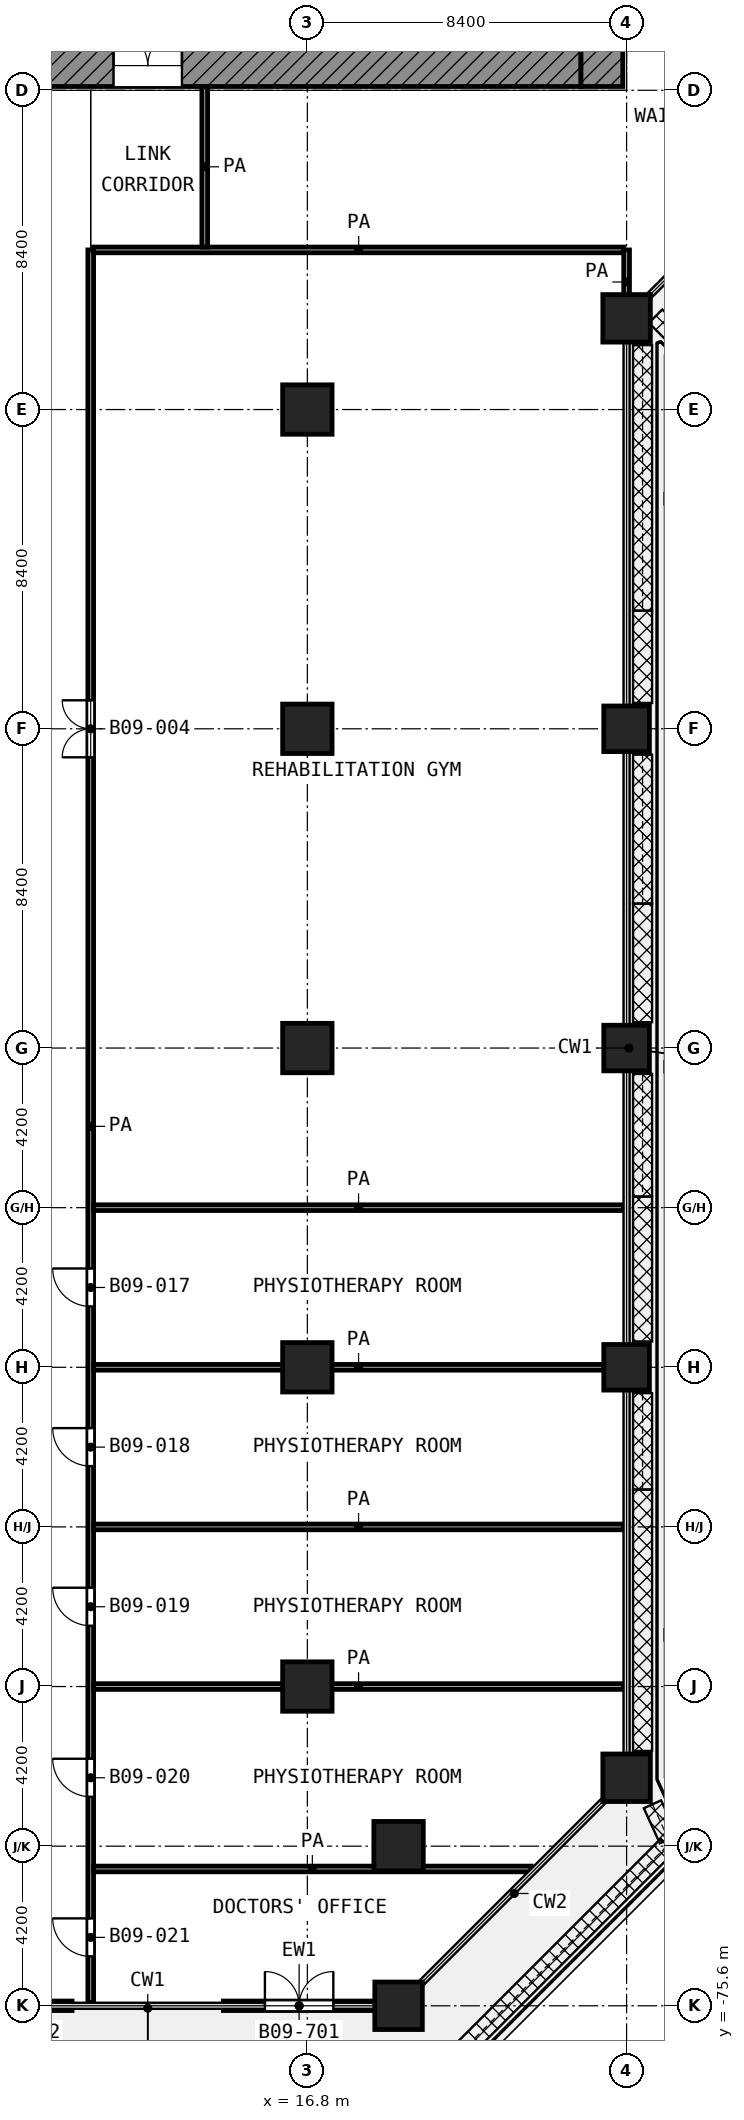
"""IFC4 building model, lengths in metres.
Left out: names, types, materials, properties, quantities, classifications, styles, units other than length and angle.
Written with IfcOpenShell. Run it as: python <this file> out.ifc"""

import sys

from ifc_helpers import new_model, si_unit, direction, frame, frame_2d, origin, origin_2d, place, context, subcontext, project, spatial, rectangle, extrude, element, fill, save


model = new_model("IFC4")
c1 = context("Model", 3, precision=1e-05, world=origin(), true_north=direction((0.0, 1.0)))
c2 = subcontext(c1, "Body", "Model", "MODEL_VIEW")
j1 = project(units=[si_unit("LENGTHUNIT", "METRE"), si_unit("PLANEANGLEUNIT", "RADIAN")], contexts=[c1])
p1 = place(None, origin())
s1 = spatial("IfcSite", under=j1, at=p1, CompositionType="ELEMENT")
p2 = place(p1, origin())
s2 = spatial("IfcBuilding", under=s1, at=p2, CompositionType="ELEMENT")
p3 = place(p2, frame((0.0, 0.0, 43.4)))
s3 = spatial("IfcBuildingStorey", under=s2, at=p3, CompositionType="ELEMENT", Elevation=43.4)
p4 = place(p3, frame((25.2, -31.2, 0.0), z_axis=(0.0, 0.0, 1.0), x_axis=(1.0, 0.0, 0.0)))
e1 = element("IfcColumn", 1, at=p4, inside=s3, PredefinedType="COLUMN", context=c2, shape_type="SweptSolid", body=[
    extrude(rectangle(XDim=1.25, YDim=1.25, at=origin_2d()), origin(), (0.0, 0.0, 1.0), 4.2),
])
for number, where, z_axis, x_axis in (
    (2, (16.8, -33.6, 0.0), (0.0, 0.0, 1.0), (1.0, 0.0, 0.0)),
    (3, (16.8, -42.0, 0.0), (0.0, 0.0, 1.0), (1.0, 0.0, 0.0)),
):
    element("IfcColumn", number, at=place(p3, frame(where, z_axis=z_axis, x_axis=x_axis)), inside=s3, PredefinedType="COLUMN", context=c2, shape_type="SweptSolid", body=[
        extrude(rectangle(XDim=1.3, YDim=1.3, at=origin_2d()), origin(), (0.0, 0.0, 1.0), 4.2),
    ])
p5 = place(p3, frame((25.2, -42.0, 0.0), z_axis=(0.0, 0.0, 1.0), x_axis=(1.0, 0.0, 0.0)))
e4 = element("IfcColumn", 4, at=p5, inside=s3, PredefinedType="COLUMN", context=c2, shape_type="SweptSolid", body=[
    extrude(rectangle(XDim=1.2, YDim=1.2, at=origin_2d()), origin(), (0.0, 0.0, 1.0), 4.2),
])
p6 = place(p3, frame((16.8, -50.4, 0.0), z_axis=(0.0, 0.0, 1.0), x_axis=(1.0, 0.0, 0.0)))
e5 = element("IfcColumn", 5, at=p6, inside=s3, PredefinedType="COLUMN", context=c2, shape_type="SweptSolid", body=[
    extrude(rectangle(XDim=1.3, YDim=1.3, at=origin_2d()), origin(), (0.0, 0.0, 1.0), 4.2),
])
p7 = place(p3, frame((25.2, -50.4, 0.0), z_axis=(0.0, 0.0, 1.0), x_axis=(1.0, 0.0, 0.0)))
e6 = element("IfcColumn", 6, at=p7, inside=s3, PredefinedType="COLUMN", context=c2, shape_type="SweptSolid", body=[
    extrude(rectangle(XDim=1.2, YDim=1.2, at=origin_2d()), origin(), (0.0, 0.0, 1.0), 4.2),
])
p8 = place(p3, frame((16.8, -58.8, 0.0), z_axis=(0.0, 0.0, 1.0), x_axis=(1.0, 0.0, 0.0)))
e7 = element("IfcColumn", 7, at=p8, inside=s3, PredefinedType="COLUMN", context=c2, shape_type="SweptSolid", body=[
    extrude(rectangle(XDim=1.3, YDim=1.3, at=origin_2d()), origin(), (0.0, 0.0, 1.0), 4.2),
])
p9 = place(p3, frame((25.2, -58.8, 0.0), z_axis=(0.0, 0.0, 1.0), x_axis=(1.0, 0.0, 0.0)))
e8 = element("IfcColumn", 8, at=p9, inside=s3, PredefinedType="COLUMN", context=c2, shape_type="SweptSolid", body=[
    extrude(rectangle(XDim=1.2, YDim=1.2, at=origin_2d()), origin(), (0.0, 0.0, 1.0), 4.2),
])
p10 = place(p3, frame((16.8, -67.2, 0.0), z_axis=(0.0, 0.0, 1.0), x_axis=(1.0, 0.0, 0.0)))
e9 = element("IfcColumn", 9, at=p10, inside=s3, PredefinedType="COLUMN", context=c2, shape_type="SweptSolid", body=[
    extrude(rectangle(XDim=1.3, YDim=1.3, at=origin_2d()), origin(), (0.0, 0.0, 1.0), 4.2),
])
p11 = place(p3, frame((25.2, -69.6, 0.0), z_axis=(0.0, 0.0, 1.0), x_axis=(1.0, 0.0, 0.0)))
e10 = element("IfcColumn", 10, at=p11, inside=s3, PredefinedType="COLUMN", context=c2, shape_type="SweptSolid", body=[
    extrude(rectangle(XDim=1.25, YDim=1.25, at=origin_2d()), origin(), (0.0, 0.0, 1.0), 4.2),
])
p12 = place(p3, frame((19.2, -71.4, 0.0), z_axis=(0.0, 0.0, 1.0), x_axis=(1.0, 0.0, 0.0)))
e11 = element("IfcColumn", 11, at=p12, inside=s3, PredefinedType="COLUMN", context=c2, shape_type="SweptSolid", body=[
    extrude(rectangle(XDim=1.3, YDim=1.3, at=origin_2d()), origin(), (0.0, 0.0, 1.0), 4.2),
])
p13 = place(p3, frame((19.2, -75.6, 0.0), z_axis=(0.0, 0.0, 1.0), x_axis=(1.0, 0.0, 0.0)))
e12 = element("IfcColumn", 12, at=p13, inside=s3, PredefinedType="COLUMN", context=c2, shape_type="SweptSolid", body=[
    extrude(rectangle(XDim=1.25, YDim=1.25, at=origin_2d()), origin(), (0.0, 0.0, 1.0), 4.2),
])
p14 = place(p3, frame((6.625, -75.6, 0.0), z_axis=(0.0, 0.0, 1.0), x_axis=(1.0, 0.0, 0.0)))
e13 = element("IfcWall", 13, at=p14, inside=s3, PredefinedType="SOLIDWALL", context=c2, shape_type="SweptSolid", body=[
    extrude(rectangle(XDim=3.983, YDim=0.25, at=frame_2d((1.992, 0.0))), origin(), (0.0, 0.0, 1.0), 3.78),
])
p15 = place(p14, frame((2.092, 0.0, 0.0)))
e14 = element("IfcOpeningElement", 14, at=p15, cuts=e13, PredefinedType="OPENING", context=c2, shape_type="SweptSolid", body=[
    extrude(rectangle(XDim=1.0, YDim=2.1, at=frame_2d((0.5, 1.05))), frame((0.0, 0.135, 0.0), z_axis=(0.0, -1.0, 0.0), x_axis=(1.0, 0.0, 0.0)), (0.0, 0.0, 1.0), 0.27),
])
p16 = place(p3, frame((14.592, -75.6, 0.0), z_axis=(0.0, 0.0, 1.0), x_axis=(1.0, 0.0, 0.0)))
e15 = element("IfcWall", 15, at=p16, inside=s3, PredefinedType="SOLIDWALL", context=c2, shape_type="SweptSolid", body=[
    extrude(rectangle(XDim=3.983, YDim=0.25, at=frame_2d((1.992, 0.0))), origin(), (0.0, 0.0, 1.0), 3.78),
])
p17 = place(p16, frame((1.092, 0.0, 0.0)))
e16 = element("IfcOpeningElement", 16, at=p17, cuts=e15, PredefinedType="OPENING", context=c2, shape_type="SweptSolid", body=[
    extrude(rectangle(XDim=1.8, YDim=2.1, at=frame_2d((0.9, 1.05))), frame((0.0, 0.135, 0.0), z_axis=(0.0, -1.0, 0.0), x_axis=(1.0, 0.0, 0.0)), (0.0, 0.0, 1.0), 0.27),
])
p18 = place(p3, frame((5.4, -24.55, 0.0), z_axis=(0.0, 0.0, 1.0), x_axis=(1.0, 0.0, 0.0)))
e17 = element("IfcWall", 17, at=p18, inside=s3, PredefinedType="SHEAR", context=c2, shape_type="SweptSolid", body=[
    extrude(rectangle(XDim=18.6, YDim=1.1, at=frame_2d((9.3, 0.0))), origin(), (0.0, 0.0, 1.0), 3.9),
])
p19 = place(p18, frame((6.3, 0.0, 0.0)))
e18 = element("IfcOpeningElement", 18, at=p19, cuts=e17, PredefinedType="OPENING", context=c2, shape_type="SweptSolid", body=[
    extrude(rectangle(XDim=1.8, YDim=2.1, at=frame_2d((0.9, 1.05))), frame((0.0, 0.56, 0.0), z_axis=(0.0, -1.0, 0.0), x_axis=(1.0, 0.0, 0.0)), (0.0, 0.0, 1.0), 1.12),
])
p20 = place(p3, frame((24.55, -25.1, 0.0), z_axis=(0.0, 0.0, 1.0), x_axis=(0.0, 1.0, 0.0)))
e19 = element("IfcWall", 19, at=p20, inside=s3, PredefinedType="SHEAR", context=c2, shape_type="SweptSolid", body=[
    extrude(rectangle(XDim=1.1, YDim=1.1, at=frame_2d((0.55, 0.0))), origin(), (0.0, 0.0, 1.0), 3.9),
])
p21 = place(p3, frame((11.175, -72.0, 0.0), z_axis=(0.0, 0.0, 1.0), x_axis=(1.0, 0.0, 0.0)))
e20 = element("IfcWall", 20, at=p21, inside=s3, PredefinedType="PARTITIONING", context=c2, shape_type="SweptSolid", body=[
    extrude(rectangle(XDim=11.512, YDim=0.15, at=frame_2d((5.756, 0.0))), origin(), (0.0, 0.0, 1.0), 3.9),
])
for number, where, z_axis, x_axis in (
    (21, (11.175, -67.2, 0.0), (0.0, 0.0, 1.0), (1.0, 0.0, 0.0)),
    (22, (11.175, -63.0, 0.0), (0.0, 0.0, 1.0), (1.0, 0.0, 0.0)),
    (23, (11.175, -58.8, 0.0), (0.0, 0.0, 1.0), (1.0, 0.0, 0.0)),
    (24, (11.175, -54.6, 0.0), (0.0, 0.0, 1.0), (1.0, 0.0, 0.0)),
):
    element("IfcWall", number, at=place(p3, frame(where, z_axis=z_axis, x_axis=x_axis)), inside=s3, PredefinedType="PARTITIONING", context=c2, shape_type="SweptSolid", body=[
        extrude(rectangle(XDim=13.945, YDim=0.15, at=frame_2d((6.973, 0.0))), origin(), (0.0, 0.0, 1.0), 3.9),
    ])
p22 = place(p3, frame((11.175, -29.4, 0.0), z_axis=(0.0, 0.0, 1.0), x_axis=(1.0, 0.0, 0.0)))
e25 = element("IfcWall", 25, at=p22, inside=s3, PredefinedType="PARTITIONING", context=c2, shape_type="SweptSolid", body=[
    extrude(rectangle(XDim=13.95, YDim=0.15, at=frame_2d((6.975, 0.0))), origin(), (0.0, 0.0, 1.0), 3.9),
])
p23 = place(p3, frame((11.1, -75.52, 0.0), z_axis=(0.0, 0.0, 1.0), x_axis=(0.0, 1.0, 0.0)))
e26 = element("IfcWall", 26, at=p23, inside=s3, PredefinedType="PARTITIONING", context=c2, shape_type="SweptSolid", body=[
    extrude(rectangle(XDim=46.12, YDim=0.15, at=frame_2d((23.06, 0.0))), origin(), (0.0, 0.0, 1.0), 3.9),
])
p24 = place(p23, frame((32.77, 0.0, 0.0)))
e27 = element("IfcOpeningElement", 27, at=p24, cuts=e26, PredefinedType="OPENING", context=c2, shape_type="SweptSolid", body=[
    extrude(rectangle(XDim=1.5, YDim=2.1, at=frame_2d((0.75, 1.05))), frame((0.0, 0.085, 0.0), z_axis=(0.0, -1.0, 0.0), x_axis=(1.0, 0.0, 0.0)), (0.0, 0.0, 1.0), 0.17),
])
p25 = place(p23, frame((18.32, 0.0, 0.0)))
e28 = element("IfcOpeningElement", 28, at=p25, cuts=e26, PredefinedType="OPENING", context=c2, shape_type="SweptSolid", body=[
    extrude(rectangle(XDim=1.0, YDim=2.1, at=frame_2d((0.5, 1.05))), frame((0.0, 0.085, 0.0), z_axis=(0.0, -1.0, 0.0), x_axis=(1.0, 0.0, 0.0)), (0.0, 0.0, 1.0), 0.17),
])
p26 = place(p23, frame((14.12, 0.0, 0.0)))
e29 = element("IfcOpeningElement", 29, at=p26, cuts=e26, PredefinedType="OPENING", context=c2, shape_type="SweptSolid", body=[
    extrude(rectangle(XDim=1.0, YDim=2.1, at=frame_2d((0.5, 1.05))), frame((0.0, 0.085, 0.0), z_axis=(0.0, -1.0, 0.0), x_axis=(1.0, 0.0, 0.0)), (0.0, 0.0, 1.0), 0.17),
])
p27 = place(p23, frame((9.92, 0.0, 0.0)))
e30 = element("IfcOpeningElement", 30, at=p27, cuts=e26, PredefinedType="OPENING", context=c2, shape_type="SweptSolid", body=[
    extrude(rectangle(XDim=1.0, YDim=2.1, at=frame_2d((0.5, 1.05))), frame((0.0, 0.085, 0.0), z_axis=(0.0, -1.0, 0.0), x_axis=(1.0, 0.0, 0.0)), (0.0, 0.0, 1.0), 0.17),
])
p28 = place(p23, frame((5.42, 0.0, 0.0)))
e31 = element("IfcOpeningElement", 31, at=p28, cuts=e26, PredefinedType="OPENING", context=c2, shape_type="SweptSolid", body=[
    extrude(rectangle(XDim=1.0, YDim=2.1, at=frame_2d((0.5, 1.05))), frame((0.0, 0.085, 0.0), z_axis=(0.0, -1.0, 0.0), x_axis=(1.0, 0.0, 0.0)), (0.0, 0.0, 1.0), 0.17),
])
p29 = place(p23, frame((1.22, 0.0, 0.0)))
e32 = element("IfcOpeningElement", 32, at=p29, cuts=e26, PredefinedType="OPENING", context=c2, shape_type="SweptSolid", body=[
    extrude(rectangle(XDim=1.0, YDim=2.1, at=frame_2d((0.5, 1.05))), frame((0.0, 0.085, 0.0), z_axis=(0.0, -1.0, 0.0), x_axis=(1.0, 0.0, 0.0)), (0.0, 0.0, 1.0), 0.17),
])
p30 = place(p3, frame((14.1, -29.325, 0.0), z_axis=(0.0, 0.0, 1.0), x_axis=(0.0, 1.0, 0.0)))
e33 = element("IfcWall", 33, at=p30, inside=s3, PredefinedType="PARTITIONING", context=c2, shape_type="SweptSolid", body=[
    extrude(rectangle(XDim=4.225, YDim=0.15, at=frame_2d((2.112, 0.0))), origin(), (0.0, 0.0, 1.0), 3.9),
])
p31 = place(p3, frame((25.2, -31.087, 0.0), z_axis=(0.0, 0.0, 1.0), x_axis=(0.0, 1.0, 0.0)))
e34 = element("IfcWall", 34, at=p31, inside=s3, PredefinedType="PARTITIONING", context=c2, shape_type="SweptSolid", body=[
    extrude(rectangle(XDim=1.687, YDim=0.15, at=frame_2d((0.844, 0.0))), origin(), (0.0, 0.0, 1.0), 3.9),
])
p32 = place(p17, origin())
e35 = element("IfcDoor", 35, at=p32, inside=s3, OperationType="DOUBLE_DOOR_SINGLE_SWING", PredefinedType="DOOR", context=c2, shape_type="SweptSolid", body=[
    extrude(rectangle(XDim=1.8, YDim=2.1, at=frame_2d((0.9, 1.05))), frame((0.0, 0.025, 0.0), z_axis=(0.0, -1.0, 0.0), x_axis=(1.0, 0.0, 0.0)), (0.0, 0.0, 1.0), 0.05),
])
fill(e16, e35)
p33 = place(p19, origin())
e36 = element("IfcDoor", 36, at=p33, inside=s3, OperationType="DOUBLE_DOOR_SINGLE_SWING", PredefinedType="DOOR", context=c2, shape_type="SweptSolid", body=[
    extrude(rectangle(XDim=1.8, YDim=2.1, at=frame_2d((0.9, 1.05))), frame((0.0, 0.025, 0.0), z_axis=(0.0, -1.0, 0.0), x_axis=(1.0, 0.0, 0.0)), (0.0, 0.0, 1.0), 0.05),
])
fill(e18, e36)
p34 = place(p24, origin())
e37 = element("IfcDoor", 37, at=p34, inside=s3, OperationType="DOUBLE_DOOR_SINGLE_SWING", PredefinedType="DOOR", context=c2, shape_type="SweptSolid", body=[
    extrude(rectangle(XDim=1.5, YDim=2.1, at=frame_2d((0.75, 1.05))), frame((0.0, 0.025, 0.0), z_axis=(0.0, -1.0, 0.0), x_axis=(1.0, 0.0, 0.0)), (0.0, 0.0, 1.0), 0.05),
])
fill(e27, e37)
p35 = place(p25, origin())
e38 = element("IfcDoor", 38, at=p35, inside=s3, OperationType="SINGLE_SWING_RIGHT", PredefinedType="DOOR", context=c2, shape_type="SweptSolid", body=[
    extrude(rectangle(XDim=1.0, YDim=2.1, at=frame_2d((0.5, 1.05))), frame((0.0, 0.025, 0.0), z_axis=(0.0, -1.0, 0.0), x_axis=(1.0, 0.0, 0.0)), (0.0, 0.0, 1.0), 0.05),
])
fill(e28, e38)
p36 = place(p26, origin())
e39 = element("IfcDoor", 39, at=p36, inside=s3, OperationType="SINGLE_SWING_RIGHT", PredefinedType="DOOR", context=c2, shape_type="SweptSolid", body=[
    extrude(rectangle(XDim=1.0, YDim=2.1, at=frame_2d((0.5, 1.05))), frame((0.0, 0.025, 0.0), z_axis=(0.0, -1.0, 0.0), x_axis=(1.0, 0.0, 0.0)), (0.0, 0.0, 1.0), 0.05),
])
fill(e29, e39)
p37 = place(p27, origin())
e40 = element("IfcDoor", 40, at=p37, inside=s3, OperationType="SINGLE_SWING_RIGHT", PredefinedType="DOOR", context=c2, shape_type="SweptSolid", body=[
    extrude(rectangle(XDim=1.0, YDim=2.1, at=frame_2d((0.5, 1.05))), frame((0.0, 0.025, 0.0), z_axis=(0.0, -1.0, 0.0), x_axis=(1.0, 0.0, 0.0)), (0.0, 0.0, 1.0), 0.05),
])
fill(e30, e40)
p38 = place(p28, origin())
e41 = element("IfcDoor", 41, at=p38, inside=s3, OperationType="SINGLE_SWING_RIGHT", PredefinedType="DOOR", context=c2, shape_type="SweptSolid", body=[
    extrude(rectangle(XDim=1.0, YDim=2.1, at=frame_2d((0.5, 1.05))), frame((0.0, 0.025, 0.0), z_axis=(0.0, -1.0, 0.0), x_axis=(1.0, 0.0, 0.0)), (0.0, 0.0, 1.0), 0.05),
])
fill(e31, e41)
p39 = place(p29, origin())
e42 = element("IfcDoor", 42, at=p39, inside=s3, OperationType="SINGLE_SWING_RIGHT", PredefinedType="DOOR", context=c2, shape_type="SweptSolid", body=[
    extrude(rectangle(XDim=1.0, YDim=2.1, at=frame_2d((0.5, 1.05))), frame((0.0, 0.025, 0.0), z_axis=(0.0, -1.0, 0.0), x_axis=(1.0, 0.0, 0.0)), (0.0, 0.0, 1.0), 0.05),
])
fill(e32, e42)
save(model, sys.argv[1])
